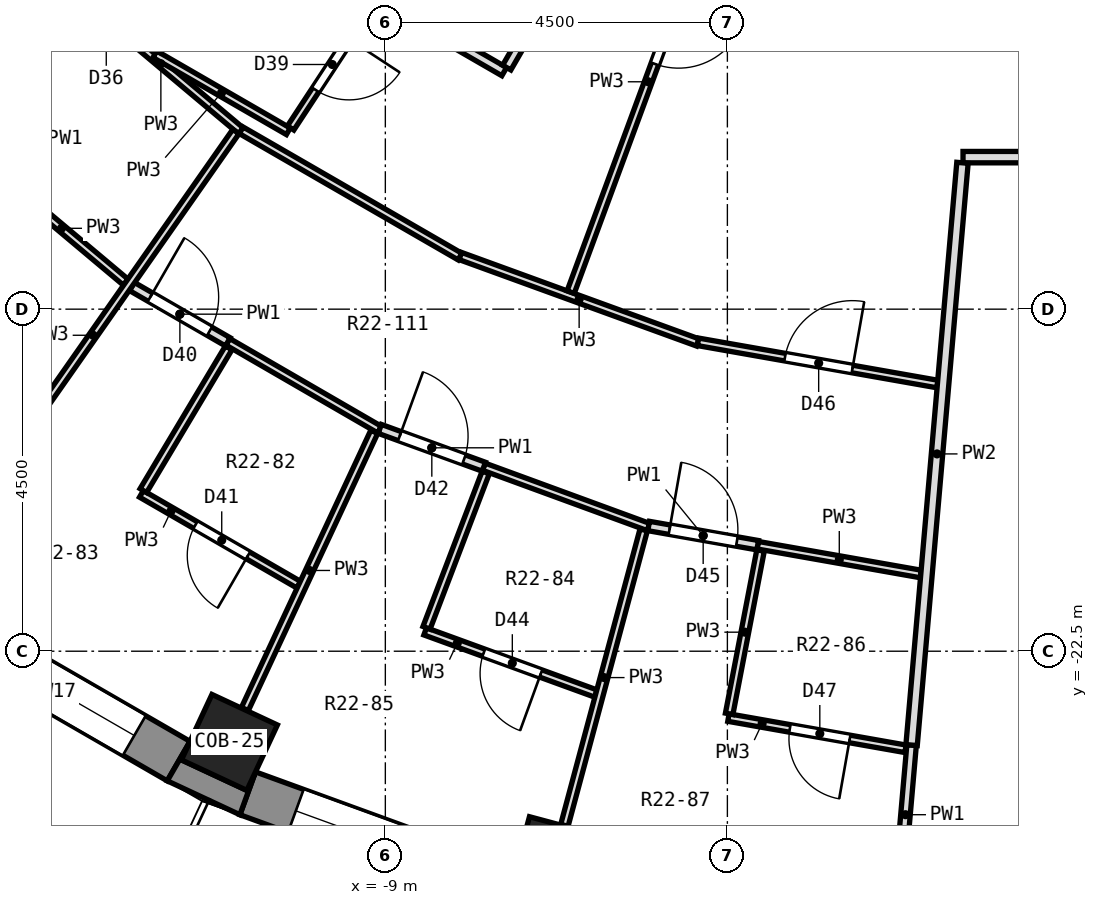
"""IFC4 building model, lengths in metres.
Left out: names, types, materials, properties, quantities, classifications, styles, units other than length and angle.
Written with IfcOpenShell. Run it as: python <this file> out.ifc"""

import sys

from ifc_helpers import new_model, si_unit, direction, frame, frame_2d, origin, origin_2d, place, context, subcontext, project, spatial, polyline, rectangle, outline, extrude, element, fill, save


model = new_model("IFC4")
c1 = context("Model", 3, precision=1e-05, world=origin(), true_north=direction((0.0, 1.0)))
c2 = subcontext(c1, "Body", "Model", "MODEL_VIEW")
j1 = project(units=[si_unit("LENGTHUNIT", "METRE"), si_unit("PLANEANGLEUNIT", "RADIAN")], contexts=[c1])
p1 = place(None, origin())
s1 = spatial("IfcSite", under=j1, at=p1, CompositionType="ELEMENT")
p2 = place(p1, origin())
s2 = spatial("IfcBuilding", under=s1, at=p2, CompositionType="ELEMENT")
p3 = place(p2, frame((0.0, 0.0, 141.4)))
s3 = spatial("IfcBuildingStorey", under=s2, at=p3, CompositionType="ELEMENT", Elevation=141.4)
for number, where, z_axis, x_axis in (
    (1, (-11.052, -23.7, 0.0), (0.0, 0.0, 1.0), (-0.423, -0.906, 0.0)),
    (2, (-6.768, -25.259, 0.0), (0.0, 0.0, 1.0), (-0.259, -0.966, 0.0)),
):
    element("IfcColumn", number, at=place(p3, frame(where, z_axis=z_axis, x_axis=x_axis)), inside=s3, PredefinedType="COLUMN", context=c2, shape_type="SweptSolid", body=[
        extrude(rectangle(XDim=0.95, YDim=0.95, at=origin_2d()), origin(), (0.0, 0.0, 1.0), 3.3),
    ])
p4 = place(p3, frame((-14.878, -22.122, 0.0), z_axis=(0.0, 0.0, 1.0), x_axis=(0.866051847062, -0.499954196102, 0.0)))
e3 = element("IfcWall", 3, at=p4, inside=s3, PredefinedType="SOLIDWALL", context=c2, shape_type="SweptSolid", body=[
    extrude(rectangle(XDim=3.648, YDim=0.6, at=frame_2d((1.824, 0.0))), origin(), (0.0, 0.0, 1.0), 2.8),
])
p5 = place(p4, frame((0.674, 0.0, 0.9)))
e4 = element("IfcOpeningElement", 4, at=p5, cuts=e3, PredefinedType="OPENING", context=c2, shape_type="SweptSolid", body=[
    extrude(rectangle(XDim=2.3, YDim=1.8, at=frame_2d((1.15, 0.9))), frame((0.0, 0.312, 0.0), z_axis=(0.0, -1.0, 0.0), x_axis=(1.0, 0.0, 0.0)), (0.0, 0.0, 1.0), 0.624),
])
p6 = place(p3, frame((-10.811, -24.369, 0.0), z_axis=(0.0, 0.0, 1.0), x_axis=(0.939703505393, -0.341990236633, 0.0)))
e5 = element("IfcWall", 5, at=p6, inside=s3, PredefinedType="SOLIDWALL", context=c2, shape_type="SweptSolid", body=[
    extrude(rectangle(XDim=3.648, YDim=0.6, at=frame_2d((1.824, 0.0))), origin(), (0.0, 0.0, 1.0), 2.8),
])
p7 = place(p6, frame((0.674, 0.0, 0.9)))
e6 = element("IfcOpeningElement", 6, at=p7, cuts=e5, PredefinedType="OPENING", context=c2, shape_type="SweptSolid", body=[
    extrude(rectangle(XDim=2.3, YDim=1.8, at=frame_2d((1.15, 0.9))), frame((0.0, 0.312, 0.0), z_axis=(0.0, -1.0, 0.0), x_axis=(1.0, 0.0, 0.0)), (0.0, 0.0, 1.0), 0.624),
])
p8 = place(p3, origin())
e7 = element("IfcWall", 7, at=p8, inside=s3, PredefinedType="SOLIDWALL", context=c2, shape_type="SweptSolid", body=[
    extrude(outline(polyline([(-10.913, -24.651), (-10.708, -24.087), (-10.822, -24.331), (-11.683, -23.93), (-11.569, -23.686), (-11.869, -24.206), (-10.913, -24.651)])), origin(), (0.0, 0.0, 1.0), 2.8),
])
p9 = place(p3, frame((-14.104, -16.228, 0.0), z_axis=(0.0, 0.0, 1.0), x_axis=(0.766093039246, -0.642729690631, 0.0)))
e8 = element("IfcWall", 8, at=p9, inside=s3, PredefinedType="PARTITIONING", context=c2, shape_type="SweptSolid", body=[
    extrude(rectangle(XDim=2.205, YDim=0.1, at=frame_2d((1.102, 0.0))), origin(), (0.0, 0.0, 1.0), 2.8),
])
p10 = place(p3, frame((-13.447, -13.517, 0.0), z_axis=(0.0, 0.0, 1.0), x_axis=(0.765959402554, -0.642888943472, 0.0)))
e9 = element("IfcWall", 9, at=p10, inside=s3, PredefinedType="PARTITIONING", context=c2, shape_type="SweptSolid", body=[
    extrude(rectangle(XDim=3.325, YDim=0.1, at=frame_2d((1.662, 0.0))), origin(), (0.0, 0.0, 1.0), 2.8),
])
p11 = place(p10, frame((0.562, 0.0, 0.0)))
e10 = element("IfcOpeningElement", 10, at=p11, cuts=e9, PredefinedType="OPENING", context=c2, shape_type="SweptSolid", body=[
    extrude(rectangle(XDim=0.9, YDim=2.1, at=frame_2d((0.45, 1.05))), frame((0.0, 0.062, 0.0), z_axis=(0.0, -1.0, 0.0), x_axis=(1.0, 0.0, 0.0)), (0.0, 0.0, 1.0), 0.124),
])
p12 = place(p3, frame((-11.072, -18.43, 0.0), z_axis=(0.0, 0.0, 1.0), x_axis=(0.865486689549, -0.500931921735, 0.0)))
e11 = element("IfcWall", 11, at=p12, inside=s3, PredefinedType="PARTITIONING", context=c2, shape_type="SweptSolid", body=[
    extrude(rectangle(XDim=2.306, YDim=0.1, at=frame_2d((1.153, 0.0))), origin(), (0.0, 0.0, 1.0), 2.8),
])
p13 = place(p3, frame((-12.209, -20.43, 0.0), z_axis=(0.0, 0.0, 1.0), x_axis=(0.865989934965, -0.500061428766, 0.0)))
e12 = element("IfcWall", 12, at=p13, inside=s3, PredefinedType="PARTITIONING", context=c2, shape_type="SweptSolid", body=[
    extrude(rectangle(XDim=2.39, YDim=0.1, at=frame_2d((1.195, 0.0))), origin(), (0.0, 0.0, 1.0), 2.8),
])
p14 = place(p13, frame((0.82, 0.0, 0.0)))
e13 = element("IfcOpeningElement", 13, at=p14, cuts=e12, PredefinedType="OPENING", context=c2, shape_type="SweptSolid", body=[
    extrude(rectangle(XDim=0.8, YDim=2.1, at=frame_2d((0.4, 1.05))), frame((0.0, 0.062, 0.0), z_axis=(0.0, -1.0, 0.0), x_axis=(1.0, 0.0, 0.0)), (0.0, 0.0, 1.0), 0.124),
])
p15 = place(p3, frame((-12.334, -17.702, 0.0), z_axis=(0.0, 0.0, 1.0), x_axis=(0.866110229381, -0.499853048967, 0.0)))
e14 = element("IfcWall", 14, at=p15, inside=s3, PredefinedType="PARTITIONING", context=c2, shape_type="SweptSolid", body=[
    extrude(rectangle(XDim=1.457, YDim=0.125, at=frame_2d((0.728, 0.0))), origin(), (0.0, 0.0, 1.0), 2.8),
])
p16 = place(p15, frame((0.278, 0.0, 0.0)))
e15 = element("IfcOpeningElement", 15, at=p16, cuts=e14, PredefinedType="OPENING", context=c2, shape_type="SweptSolid", body=[
    extrude(rectangle(XDim=0.9, YDim=2.1, at=frame_2d((0.45, 1.05))), frame((0.0, 0.074, 0.0), z_axis=(0.0, -1.0, 0.0), x_axis=(1.0, 0.0, 0.0)), (0.0, 0.0, 1.0), 0.149),
])
p17 = place(p3, frame((-10.896, -15.647, 0.0), z_axis=(0.0, 0.0, 1.0), x_axis=(0.866052313871, -0.499953387465, 0.0)))
e16 = element("IfcWall", 16, at=p17, inside=s3, PredefinedType="PARTITIONING", context=c2, shape_type="SweptSolid", body=[
    extrude(rectangle(XDim=3.325, YDim=0.1, at=frame_2d((1.663, 0.0))), origin(), (0.0, 0.0, 1.0), 2.8),
])
p18 = place(p3, frame((-12.032, -14.647, 0.0), z_axis=(0.0, 0.0, 1.0), x_axis=(0.866085299251, -0.499896243657, 0.0)))
e17 = element("IfcWall", 17, at=p18, inside=s3, PredefinedType="PARTITIONING", context=c2, shape_type="SweptSolid", body=[
    extrude(rectangle(XDim=2.027, YDim=0.1, at=frame_2d((1.013, 0.0))), origin(), (0.0, 0.0, 1.0), 2.8),
])
p19 = place(p3, frame((-9.166, -13.876, 0.0), z_axis=(0.0, 0.0, 1.0), x_axis=(0.866008543052, -0.500029202507, 0.0)))
e18 = element("IfcWall", 18, at=p19, inside=s3, PredefinedType="PARTITIONING", context=c2, shape_type="SweptSolid", body=[
    extrude(rectangle(XDim=1.998, YDim=0.125, at=frame_2d((0.999, 0.0))), origin(), (0.0, 0.0, 1.0), 2.8),
])
p20 = place(p3, frame((-7.704, -20.073, 0.0), z_axis=(0.0, 0.0, 1.0), x_axis=(0.939002837997, -0.343909392476, 0.0)))
e19 = element("IfcWall", 19, at=p20, inside=s3, PredefinedType="PARTITIONING", context=c2, shape_type="SweptSolid", body=[
    extrude(rectangle(XDim=2.306, YDim=0.1, at=frame_2d((1.153, 0.0))), origin(), (0.0, 0.0, 1.0), 2.8),
])
p21 = place(p3, frame((-8.476, -22.239, 0.0), z_axis=(0.0, 0.0, 1.0), x_axis=(0.939644231496, -0.342153062556, 0.0)))
e20 = element("IfcWall", 20, at=p21, inside=s3, PredefinedType="PARTITIONING", context=c2, shape_type="SweptSolid", body=[
    extrude(rectangle(XDim=2.39, YDim=0.1, at=frame_2d((1.195, 0.0))), origin(), (0.0, 0.0, 1.0), 2.8),
])
p22 = place(p21, frame((0.82, 0.0, 0.0)))
e21 = element("IfcOpeningElement", 21, at=p22, cuts=e20, PredefinedType="OPENING", context=c2, shape_type="SweptSolid", body=[
    extrude(rectangle(XDim=0.8, YDim=2.1, at=frame_2d((0.4, 1.05))), frame((0.0, 0.062, 0.0), z_axis=(0.0, -1.0, 0.0), x_axis=(1.0, 0.0, 0.0)), (0.0, 0.0, 1.0), 0.124),
])
p23 = place(p3, frame((-9.073, -19.575, 0.0), z_axis=(0.0, 0.0, 1.0), x_axis=(0.939788529673, -0.341756520778, 0.0)))
e22 = element("IfcWall", 22, at=p23, inside=s3, PredefinedType="PARTITIONING", context=c2, shape_type="SweptSolid", body=[
    extrude(rectangle(XDim=1.457, YDim=0.125, at=frame_2d((0.728, 0.0))), origin(), (0.0, 0.0, 1.0), 2.8),
])
p24 = place(p23, frame((0.278, 0.0, 0.0)))
e23 = element("IfcOpeningElement", 23, at=p24, cuts=e22, PredefinedType="OPENING", context=c2, shape_type="SweptSolid", body=[
    extrude(rectangle(XDim=0.9, YDim=2.1, at=frame_2d((0.45, 1.05))), frame((0.0, 0.074, 0.0), z_axis=(0.0, -1.0, 0.0), x_axis=(1.0, 0.0, 0.0)), (0.0, 0.0, 1.0), 0.149),
])
p25 = place(p3, frame((-8.013, -17.301, 0.0), z_axis=(0.0, 0.0, 1.0), x_axis=(0.939703357515, -0.341990642965, 0.0)))
e24 = element("IfcWall", 24, at=p25, inside=s3, PredefinedType="PARTITIONING", context=c2, shape_type="SweptSolid", body=[
    extrude(rectangle(XDim=3.325, YDim=0.1, at=frame_2d((1.663, 0.0))), origin(), (0.0, 0.0, 1.0), 2.8),
])
p26 = place(p3, frame((-4.486, -23.373, 0.0), z_axis=(0.0, 0.0, 1.0), x_axis=(0.984805365509, -0.173661717325, 0.0)))
e25 = element("IfcWall", 25, at=p26, inside=s3, PredefinedType="PARTITIONING", context=c2, shape_type="SweptSolid", body=[
    extrude(rectangle(XDim=2.366, YDim=0.1, at=frame_2d((1.183, 0.0))), origin(), (0.0, 0.0, 1.0), 2.8),
])
p27 = place(p26, frame((0.821, 0.0, 0.0)))
e26 = element("IfcOpeningElement", 26, at=p27, cuts=e25, PredefinedType="OPENING", context=c2, shape_type="SweptSolid", body=[
    extrude(rectangle(XDim=0.8, YDim=2.1, at=frame_2d((0.4, 1.05))), frame((0.0, 0.062, 0.0), z_axis=(0.0, -1.0, 0.0), x_axis=(1.0, 0.0, 0.0)), (0.0, 0.0, 1.0), 0.124),
])
p28 = place(p3, frame((-4.101, -21.105, 0.0), z_axis=(0.0, 0.0, 1.0), x_axis=(0.984793705714, -0.173727825019, 0.0)))
e27 = element("IfcWall", 27, at=p28, inside=s3, PredefinedType="PARTITIONING", context=c2, shape_type="SweptSolid", body=[
    extrude(rectangle(XDim=2.18, YDim=0.1, at=frame_2d((1.09, 0.0))), origin(), (0.0, 0.0, 1.0), 2.8),
])
p29 = place(p3, frame((-5.536, -20.853, 0.0), z_axis=(0.0, 0.0, 1.0), x_axis=(0.984862774054, -0.173335848233, 0.0)))
e28 = element("IfcWall", 28, at=p29, inside=s3, PredefinedType="PARTITIONING", context=c2, shape_type="SweptSolid", body=[
    extrude(rectangle(XDim=1.456, YDim=0.125, at=frame_2d((0.728, 0.0))), origin(), (0.0, 0.0, 1.0), 2.8),
])
p30 = place(p29, frame((0.278, 0.0, 0.0)))
e29 = element("IfcOpeningElement", 29, at=p30, cuts=e28, PredefinedType="OPENING", context=c2, shape_type="SweptSolid", body=[
    extrude(rectangle(XDim=0.9, YDim=2.1, at=frame_2d((0.45, 1.05))), frame((0.0, 0.074, 0.0), z_axis=(0.0, -1.0, 0.0), x_axis=(1.0, 0.0, 0.0)), (0.0, 0.0, 1.0), 0.149),
])
p31 = place(p3, frame((-4.887, -18.43, 0.0), z_axis=(0.0, 0.0, 1.0), x_axis=(0.984827318257, -0.173537181071, 0.0)))
e30 = element("IfcWall", 30, at=p31, inside=s3, PredefinedType="PARTITIONING", context=c2, shape_type="SweptSolid", body=[
    extrude(rectangle(XDim=3.199, YDim=0.1, at=frame_2d((1.6, 0.0))), origin(), (0.0, 0.0, 1.0), 2.8),
])
p32 = place(p31, frame((1.162, 0.0, 0.0)))
e31 = element("IfcOpeningElement", 31, at=p32, cuts=e30, PredefinedType="OPENING", context=c2, shape_type="SweptSolid", body=[
    extrude(rectangle(XDim=0.9, YDim=2.1, at=frame_2d((0.45, 1.05))), frame((0.0, 0.062, 0.0), z_axis=(0.0, -1.0, 0.0), x_axis=(1.0, 0.0, 0.0)), (0.0, 0.0, 1.0), 0.124),
])
p33 = place(p3, frame((-1.4, -16.0, 0.0), z_axis=(0.0, 0.0, 1.0), x_axis=(1.0, 0.0, 0.0)))
e32 = element("IfcWall", 32, at=p33, inside=s3, PredefinedType="PARTITIONING", context=c2, shape_type="SweptSolid", body=[
    extrude(rectangle(XDim=3.143, YDim=0.15, at=frame_2d((1.572, 0.0))), origin(), (0.0, 0.0, 1.0), 2.8),
])
p34 = place(p3, frame((-14.721, -21.023, 0.0), z_axis=(0.0, 0.0, 1.0), x_axis=(0.573845384598, 0.818963658886, 0.0)))
e33 = element("IfcWall", 33, at=p34, inside=s3, PredefinedType="PARTITIONING", context=c2, shape_type="SweptSolid", body=[
    extrude(rectangle(XDim=6.544, YDim=0.1, at=frame_2d((3.272, 0.0))), origin(), (0.0, 0.0, 1.0), 2.8),
])
p35 = place(p3, frame((-10.246, -15.616, 0.0), z_axis=(0.0, 0.0, 1.0), x_axis=(0.548583914552, 0.836095502138, 0.0)))
e34 = element("IfcWall", 34, at=p35, inside=s3, PredefinedType="PARTITIONING", context=c2, shape_type="SweptSolid", body=[
    extrude(rectangle(XDim=1.985, YDim=0.1, at=frame_2d((0.993, 0.0))), origin(), (0.0, 0.0, 1.0), 2.8),
])
p36 = place(p35, frame((0.599, 0.0, 0.0)))
e35 = element("IfcOpeningElement", 35, at=p36, cuts=e34, PredefinedType="OPENING", context=c2, shape_type="SweptSolid", body=[
    extrude(rectangle(XDim=0.8, YDim=2.1, at=frame_2d((0.4, 1.05))), frame((0.0, 0.062, 0.0), z_axis=(0.0, -1.0, 0.0), x_axis=(1.0, 0.0, 0.0)), (0.0, 0.0, 1.0), 0.124),
])
p37 = place(p3, frame((-12.183, -20.387, 0.0), z_axis=(0.0, 0.0, 1.0), x_axis=(0.512903306279, 0.85844638645, 0.0)))
e36 = element("IfcWall", 36, at=p37, inside=s3, PredefinedType="PARTITIONING", context=c2, shape_type="SweptSolid", body=[
    extrude(rectangle(XDim=2.188, YDim=0.1, at=frame_2d((1.094, 0.0))), origin(), (0.0, 0.0, 1.0), 2.8),
])
p38 = place(p3, frame((-7.403, -14.822, 0.0), z_axis=(0.0, 0.0, 1.0), x_axis=(0.500017246033, 0.866015446554, 0.0)))
e37 = element("IfcWall", 37, at=p38, inside=s3, PredefinedType="PARTITIONING", context=c2, shape_type="SweptSolid", body=[
    extrude(rectangle(XDim=4.875, YDim=0.125, at=frame_2d((2.438, 0.0))), origin(), (0.0, 0.0, 1.0), 2.8),
])
p39 = place(p3, frame((-12.009, -14.6, 0.0), z_axis=(0.0, 0.0, 1.0), x_axis=(0.499729383125, 0.866181588145, 0.0)))
e38 = element("IfcWall", 38, at=p39, inside=s3, PredefinedType="PARTITIONING", context=c2, shape_type="SweptSolid", body=[
    extrude(rectangle(XDim=1.017, YDim=0.1, at=frame_2d((0.508, 0.0))), origin(), (0.0, 0.0, 1.0), 2.8),
])
p40 = place(p3, frame((-10.848, -23.26, 0.0), z_axis=(0.0, 0.0, 1.0), x_axis=(0.422895432818, 0.906178488434, 0.0)))
e39 = element("IfcWall", 39, at=p40, inside=s3, PredefinedType="PARTITIONING", context=c2, shape_type="SweptSolid", body=[
    extrude(rectangle(XDim=4.023, YDim=0.1, at=frame_2d((2.011, 0.0))), origin(), (0.0, 0.0, 1.0), 2.8),
])
p41 = place(p3, frame((-8.458, -22.192, 0.0), z_axis=(0.0, 0.0, 1.0), x_axis=(0.35615776917, 0.934425836255, 0.0)))
e40 = element("IfcWall", 40, at=p41, inside=s3, PredefinedType="PARTITIONING", context=c2, shape_type="SweptSolid", body=[
    extrude(rectangle(XDim=2.188, YDim=0.1, at=frame_2d((1.094, 0.0))), origin(), (0.0, 0.0, 1.0), 2.8),
])
p42 = place(p3, frame((-6.562, -17.776, 0.0), z_axis=(0.0, 0.0, 1.0), x_axis=(0.346197589544, 0.938161622, 0.0)))
e41 = element("IfcWall", 41, at=p42, inside=s3, PredefinedType="PARTITIONING", context=c2, shape_type="SweptSolid", body=[
    extrude(rectangle(XDim=7.285, YDim=0.1, at=frame_2d((3.643, 0.0))), origin(), (0.0, 0.0, 1.0), 2.8),
])
p43 = place(p42, frame((3.2, 0.0, 0.0)))
e42 = element("IfcOpeningElement", 42, at=p43, cuts=e41, PredefinedType="OPENING", context=c2, shape_type="SweptSolid", body=[
    extrude(rectangle(XDim=0.9, YDim=2.1, at=frame_2d((0.45, 1.05))), frame((0.0, 0.062, 0.0), z_axis=(0.0, -1.0, 0.0), x_axis=(1.0, 0.0, 0.0)), (0.0, 0.0, 1.0), 0.124),
])
p44 = place(p3, frame((-6.644, -24.79, 0.0), z_axis=(0.0, 0.0, 1.0), x_axis=(0.259176889868, 0.965829871022, 0.0)))
e43 = element("IfcWall", 43, at=p44, inside=s3, PredefinedType="PARTITIONING", context=c2, shape_type="SweptSolid", body=[
    extrude(rectangle(XDim=4.023, YDim=0.1, at=frame_2d((2.012, 0.0))), origin(), (0.0, 0.0, 1.0), 2.8),
])
p45 = place(p3, frame((-4.477, -23.324, 0.0), z_axis=(0.0, 0.0, 1.0), x_axis=(0.188685986474, 0.982037473067, 0.0)))
e44 = element("IfcWall", 44, at=p45, inside=s3, PredefinedType="PARTITIONING", context=c2, shape_type="SweptSolid", body=[
    extrude(rectangle(XDim=2.188, YDim=0.1, at=frame_2d((1.094, 0.0))), origin(), (0.0, 0.0, 1.0), 2.8),
])
p46 = place(p3, frame((-2.237, -25.567, 0.0), z_axis=(0.0, 0.0, 1.0), x_axis=(0.087185058121, 0.996192132894, 0.0)))
e45 = element("IfcWall", 45, at=p46, inside=s3, PredefinedType="PARTITIONING", context=c2, shape_type="SweptSolid", body=[
    extrude(rectangle(XDim=1.84, YDim=0.125, at=frame_2d((0.92, 0.0))), origin(), (0.0, 0.0, 1.0), 2.8),
])
p47 = place(p3, frame((-2.077, -23.735, 0.0), z_axis=(0.0, 0.0, 1.0), x_axis=(0.087062572149, 0.996202845073, 0.0)))
e46 = element("IfcWall", 46, at=p47, inside=s3, PredefinedType="PARTITIONING", context=c2, shape_type="SweptSolid", body=[
    extrude(rectangle(XDim=7.689, YDim=0.15, at=frame_2d((3.845, 0.0))), origin(), (0.0, 0.0, 1.0), 2.8),
])
p48 = place(p5, origin())
e47 = element("IfcWindow", 47, at=p48, inside=s3, PartitioningType="SINGLE_PANEL", PredefinedType="WINDOW", context=c2, shape_type="SweptSolid", body=[
    extrude(rectangle(XDim=2.3, YDim=1.8, at=frame_2d((1.15, 0.9))), frame((0.0, 0.18, 0.0), z_axis=(0.0, -1.0, 0.0), x_axis=(1.0, 0.0, 0.0)), (0.0, 0.0, 1.0), 0.06),
])
fill(e4, e47)
p49 = place(p7, origin())
e48 = element("IfcWindow", 48, at=p49, inside=s3, PartitioningType="SINGLE_PANEL", PredefinedType="WINDOW", context=c2, shape_type="SweptSolid", body=[
    extrude(rectangle(XDim=2.3, YDim=1.8, at=frame_2d((1.15, 0.9))), frame((0.0, 0.18, 0.0), z_axis=(0.0, -1.0, 0.0), x_axis=(1.0, 0.0, 0.0)), (0.0, 0.0, 1.0), 0.06),
])
fill(e6, e48)
p50 = place(p36, frame((0.8, 0.0, 0.0), z_axis=(0.0, 0.0, 1.0), x_axis=(-1.0, 0.0, 0.0)))
e49 = element("IfcDoor", 49, at=p50, inside=s3, OperationType="SINGLE_SWING_LEFT", PredefinedType="DOOR", context=c2, shape_type="SweptSolid", body=[
    extrude(rectangle(XDim=0.8, YDim=2.1, at=frame_2d((0.4, 1.05))), frame((0.0, 0.025, 0.0), z_axis=(0.0, -1.0, 0.0), x_axis=(1.0, 0.0, 0.0)), (0.0, 0.0, 1.0), 0.05),
])
fill(e35, e49)
p51 = place(p16, origin())
e50 = element("IfcDoor", 50, at=p51, inside=s3, OperationType="SINGLE_SWING_LEFT", PredefinedType="DOOR", context=c2, shape_type="SweptSolid", body=[
    extrude(rectangle(XDim=0.9, YDim=2.1, at=frame_2d((0.45, 1.05))), frame((0.0, 0.025, 0.0), z_axis=(0.0, -1.0, 0.0), x_axis=(1.0, 0.0, 0.0)), (0.0, 0.0, 1.0), 0.05),
])
fill(e15, e50)
p52 = place(p14, frame((0.8, 0.0, 0.0), z_axis=(0.0, 0.0, 1.0), x_axis=(-1.0, 0.0, 0.0)))
e51 = element("IfcDoor", 51, at=p52, inside=s3, OperationType="SINGLE_SWING_LEFT", PredefinedType="DOOR", context=c2, shape_type="SweptSolid", body=[
    extrude(rectangle(XDim=0.8, YDim=2.1, at=frame_2d((0.4, 1.05))), frame((0.0, 0.025, 0.0), z_axis=(0.0, -1.0, 0.0), x_axis=(1.0, 0.0, 0.0)), (0.0, 0.0, 1.0), 0.05),
])
fill(e13, e51)
p53 = place(p24, origin())
e52 = element("IfcDoor", 52, at=p53, inside=s3, OperationType="SINGLE_SWING_LEFT", PredefinedType="DOOR", context=c2, shape_type="SweptSolid", body=[
    extrude(rectangle(XDim=0.9, YDim=2.1, at=frame_2d((0.45, 1.05))), frame((0.0, 0.025, 0.0), z_axis=(0.0, -1.0, 0.0), x_axis=(1.0, 0.0, 0.0)), (0.0, 0.0, 1.0), 0.05),
])
fill(e23, e52)
p54 = place(p43, frame((0.9, 0.0, 0.0), z_axis=(0.0, 0.0, 1.0), x_axis=(-1.0, 0.0, 0.0)))
e53 = element("IfcDoor", 53, at=p54, inside=s3, OperationType="SINGLE_SWING_LEFT", PredefinedType="DOOR", context=c2, shape_type="SweptSolid", body=[
    extrude(rectangle(XDim=0.9, YDim=2.1, at=frame_2d((0.45, 1.05))), frame((0.0, 0.025, 0.0), z_axis=(0.0, -1.0, 0.0), x_axis=(1.0, 0.0, 0.0)), (0.0, 0.0, 1.0), 0.05),
])
fill(e42, e53)
p55 = place(p22, frame((0.8, 0.0, 0.0), z_axis=(0.0, 0.0, 1.0), x_axis=(-1.0, 0.0, 0.0)))
e54 = element("IfcDoor", 54, at=p55, inside=s3, OperationType="SINGLE_SWING_LEFT", PredefinedType="DOOR", context=c2, shape_type="SweptSolid", body=[
    extrude(rectangle(XDim=0.8, YDim=2.1, at=frame_2d((0.4, 1.05))), frame((0.0, 0.025, 0.0), z_axis=(0.0, -1.0, 0.0), x_axis=(1.0, 0.0, 0.0)), (0.0, 0.0, 1.0), 0.05),
])
fill(e21, e54)
p56 = place(p30, origin())
e55 = element("IfcDoor", 55, at=p56, inside=s3, OperationType="SINGLE_SWING_LEFT", PredefinedType="DOOR", context=c2, shape_type="SweptSolid", body=[
    extrude(rectangle(XDim=0.9, YDim=2.1, at=frame_2d((0.45, 1.05))), frame((0.0, 0.025, 0.0), z_axis=(0.0, -1.0, 0.0), x_axis=(1.0, 0.0, 0.0)), (0.0, 0.0, 1.0), 0.05),
])
fill(e29, e55)
p57 = place(p32, origin())
e56 = element("IfcDoor", 56, at=p57, inside=s3, OperationType="SINGLE_SWING_RIGHT", PredefinedType="DOOR", context=c2, shape_type="SweptSolid", body=[
    extrude(rectangle(XDim=0.9, YDim=2.1, at=frame_2d((0.45, 1.05))), frame((0.0, 0.025, 0.0), z_axis=(0.0, -1.0, 0.0), x_axis=(1.0, 0.0, 0.0)), (0.0, 0.0, 1.0), 0.05),
])
fill(e31, e56)
p58 = place(p27, frame((0.8, 0.0, 0.0), z_axis=(0.0, 0.0, 1.0), x_axis=(-1.0, 0.0, 0.0)))
e57 = element("IfcDoor", 57, at=p58, inside=s3, OperationType="SINGLE_SWING_LEFT", PredefinedType="DOOR", context=c2, shape_type="SweptSolid", body=[
    extrude(rectangle(XDim=0.8, YDim=2.1, at=frame_2d((0.4, 1.05))), frame((0.0, 0.025, 0.0), z_axis=(0.0, -1.0, 0.0), x_axis=(1.0, 0.0, 0.0)), (0.0, 0.0, 1.0), 0.05),
])
fill(e26, e57)
save(model, sys.argv[1])
